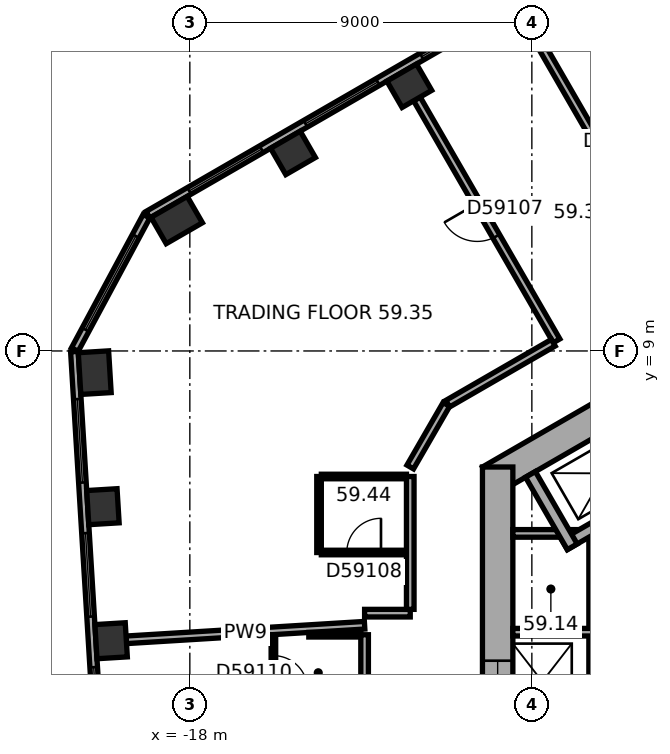
"""IFC4 building model, lengths in metres.
Left out: names, types, materials, properties, quantities, classifications, styles, units other than length and angle.
Written with IfcOpenShell. Run it as: python <this file> out.ifc"""

import sys

from ifc_helpers import new_model, si_unit, direction, frame, frame_2d, origin, origin_2d, place, context, subcontext, project, spatial, rectangle, extrude, element, fill, save


model = new_model("IFC4")
c1 = context("Model", 3, precision=1e-05, world=origin(), true_north=direction((0.0, 1.0)))
c2 = subcontext(c1, "Body", "Model", "MODEL_VIEW")
j1 = project(units=[si_unit("LENGTHUNIT", "METRE"), si_unit("PLANEANGLEUNIT", "RADIAN")], contexts=[c1])
p1 = place(None, origin())
s1 = spatial("IfcSite", under=j1, at=p1, CompositionType="ELEMENT")
p2 = place(p1, origin())
s2 = spatial("IfcBuilding", under=s1, at=p2, CompositionType="ELEMENT")
p3 = place(p2, frame((0.0, 0.0, 240.2)))
s3 = spatial("IfcBuildingStorey", under=s2, at=p3, CompositionType="ELEMENT", Elevation=240.2)
for number, where, z_axis, x_axis in (
    (1, (-12.225, 15.978, 0.0), (0.0, 0.0, 1.0), (-0.866, -0.5, 0.0)),
    (2, (-15.285, 14.211, 0.0), (0.0, 0.0, 1.0), (-0.866, -0.5, 0.0)),
):
    element("IfcColumn", number, at=place(p3, frame(where, z_axis=z_axis, x_axis=x_axis)), inside=s3, PredefinedType="COLUMN", context=c2, shape_type="SweptSolid", body=[
        extrude(rectangle(XDim=0.9, YDim=0.8, at=origin_2d()), origin(), (0.0, 0.0, 1.0), 3.7),
    ])
for number, where, z_axis, x_axis in (
    (3, (-18.345, 12.445, 0.0), (0.0, 0.0, 1.0), (-0.866, -0.5, 0.0)),
    (4, (-20.503, 8.429, 0.0), (0.0, 0.0, 1.0), (0.061, -0.998, 0.0)),
):
    element("IfcColumn", number, at=place(p3, frame(where, z_axis=z_axis, x_axis=x_axis)), inside=s3, PredefinedType="COLUMN", context=c2, shape_type="SweptSolid", body=[
        extrude(rectangle(XDim=1.1, YDim=0.8, at=origin_2d()), origin(), (0.0, 0.0, 1.0), 3.7),
    ])
for number, where, z_axis, x_axis in (
    (5, (-20.287, 4.902, 0.0), (0.0, 0.0, 1.0), (0.061, -0.998, 0.0)),
    (6, (-20.071, 1.375, 0.0), (0.0, 0.0, 1.0), (0.061, -0.998, 0.0)),
):
    element("IfcColumn", number, at=place(p3, frame(where, z_axis=z_axis, x_axis=x_axis)), inside=s3, PredefinedType="COLUMN", context=c2, shape_type="SweptSolid", body=[
        extrude(rectangle(XDim=0.9, YDim=0.8, at=origin_2d()), origin(), (0.0, 0.0, 1.0), 3.7),
    ])
p4 = place(p3, frame((0.2, 11.547, 0.0), z_axis=(0.0, 0.0, 1.0), x_axis=(-0.866023897231, -0.500002609418, 0.0)))
e7 = element("IfcWall", 7, at=p4, inside=s3, PredefinedType="SHEAR", context=c2, shape_type="SweptSolid", body=[
    extrude(rectangle(XDim=11.894, YDim=0.8, at=frame_2d((5.947, 0.0))), origin(), (0.0, 0.0, 1.0), 3.7),
])
p5 = place(p4, frame((6.147, 0.0, 0.0)))
e8 = element("IfcOpeningElement", 8, at=p5, cuts=e7, PredefinedType="OPENING", context=c2, shape_type="SweptSolid", body=[
    extrude(rectangle(XDim=1.5, YDim=2.1, at=frame_2d((0.75, 1.05))), frame((0.0, 0.41, 0.0), z_axis=(0.0, -1.0, 0.0), x_axis=(1.0, 0.0, 0.0)), (0.0, 0.0, 1.0), 0.82),
])
p6 = place(p4, frame((2.997, 0.0, 0.0)))
e9 = element("IfcOpeningElement", 9, at=p6, cuts=e7, PredefinedType="OPENING", context=c2, shape_type="SweptSolid", body=[
    extrude(rectangle(XDim=0.9, YDim=2.1, at=frame_2d((0.45, 1.05))), frame((0.0, 0.41, 0.0), z_axis=(0.0, -1.0, 0.0), x_axis=(1.0, 0.0, 0.0)), (0.0, 0.0, 1.0), 0.82),
])
p7 = place(p3, frame((-9.9, 5.947, 0.0), z_axis=(0.0, 0.0, 1.0), x_axis=(0.0, -1.0, 0.0)))
e10 = element("IfcWall", 10, at=p7, inside=s3, PredefinedType="SHEAR", context=c2, shape_type="SweptSolid", body=[
    extrude(rectangle(XDim=11.894, YDim=0.8, at=frame_2d((5.947, 0.0))), origin(), (0.0, 0.0, 1.0), 3.7),
])
p8 = place(p7, frame((5.097, 0.0, 0.0)))
e11 = element("IfcOpeningElement", 11, at=p8, cuts=e10, PredefinedType="OPENING", context=c2, shape_type="SweptSolid", body=[
    extrude(rectangle(XDim=1.1, YDim=2.1, at=frame_2d((0.55, 1.05))), frame((0.0, 0.41, 0.0), z_axis=(0.0, -1.0, 0.0), x_axis=(1.0, 0.0, 0.0)), (0.0, 0.0, 1.0), 0.82),
])
p9 = place(p7, frame((7.697, 0.0, 0.0)))
e12 = element("IfcOpeningElement", 12, at=p9, cuts=e10, PredefinedType="OPENING", context=c2, shape_type="SweptSolid", body=[
    extrude(rectangle(XDim=1.1, YDim=2.1, at=frame_2d((0.55, 1.05))), frame((0.0, 0.41, 0.0), z_axis=(0.0, -1.0, 0.0), x_axis=(1.0, 0.0, 0.0)), (0.0, 0.0, 1.0), 0.82),
])
p10 = place(p3, frame((-2.786, 22.005, 0.0), z_axis=(0.0, 0.0, 1.0), x_axis=(-0.866026555358, -0.49999800541, 0.0)))
e13 = element("IfcWall", 13, at=p10, inside=s3, PredefinedType="STANDARD", context=c2, shape_type="SweptSolid", body=[
    extrude(rectangle(XDim=18.841, YDim=0.2, at=frame_2d((9.421, 0.0))), origin(), (0.0, 0.0, 1.0), 3.7),
])
p11 = place(p10, frame((1.254, 0.0, 0.9)))
e14 = element("IfcOpeningElement", 14, at=p11, cuts=e13, PredefinedType="OPENING", context=c2, shape_type="SweptSolid", body=[
    extrude(rectangle(XDim=2.2, YDim=2.0, at=frame_2d((1.1, 1.0))), frame((0.0, 0.11, 0.0), z_axis=(0.0, -1.0, 0.0), x_axis=(1.0, 0.0, 0.0)), (0.0, 0.0, 1.0), 0.22),
])
p12 = place(p10, frame((4.788, 0.0, 0.9)))
e15 = element("IfcOpeningElement", 15, at=p12, cuts=e13, PredefinedType="OPENING", context=c2, shape_type="SweptSolid", body=[
    extrude(rectangle(XDim=2.2, YDim=2.0, at=frame_2d((1.1, 1.0))), frame((0.0, 0.11, 0.0), z_axis=(0.0, -1.0, 0.0), x_axis=(1.0, 0.0, 0.0)), (0.0, 0.0, 1.0), 0.22),
])
p13 = place(p10, frame((8.321, 0.0, 0.9)))
e16 = element("IfcOpeningElement", 16, at=p13, cuts=e13, PredefinedType="OPENING", context=c2, shape_type="SweptSolid", body=[
    extrude(rectangle(XDim=2.2, YDim=2.0, at=frame_2d((1.1, 1.0))), frame((0.0, 0.11, 0.0), z_axis=(0.0, -1.0, 0.0), x_axis=(1.0, 0.0, 0.0)), (0.0, 0.0, 1.0), 0.22),
])
p14 = place(p10, frame((11.855, 0.0, 0.9)))
e17 = element("IfcOpeningElement", 17, at=p14, cuts=e13, PredefinedType="OPENING", context=c2, shape_type="SweptSolid", body=[
    extrude(rectangle(XDim=2.2, YDim=2.0, at=frame_2d((1.1, 1.0))), frame((0.0, 0.11, 0.0), z_axis=(0.0, -1.0, 0.0), x_axis=(1.0, 0.0, 0.0)), (0.0, 0.0, 1.0), 0.22),
])
p15 = place(p10, frame((15.389, 0.0, 0.9)))
e18 = element("IfcOpeningElement", 18, at=p15, cuts=e13, PredefinedType="OPENING", context=c2, shape_type="SweptSolid", body=[
    extrude(rectangle(XDim=2.2, YDim=2.0, at=frame_2d((1.1, 1.0))), frame((0.0, 0.11, 0.0), z_axis=(0.0, -1.0, 0.0), x_axis=(1.0, 0.0, 0.0)), (0.0, 0.0, 1.0), 0.22),
])
p16 = place(p3, frame((-19.141, 12.545, 0.0), z_axis=(0.0, 0.0, 1.0), x_axis=(-0.473306370921, -0.880897882416, 0.0)))
e19 = element("IfcWall", 19, at=p16, inside=s3, PredefinedType="STANDARD", context=c2, shape_type="SweptSolid", body=[
    extrude(rectangle(XDim=3.983, YDim=0.2, at=frame_2d((1.991, 0.0))), origin(), (0.0, 0.0, 1.0), 3.7),
])
p17 = place(p16, frame((0.591, 0.0, 0.9)))
e20 = element("IfcOpeningElement", 20, at=p17, cuts=e19, PredefinedType="OPENING", context=c2, shape_type="SweptSolid", body=[
    extrude(rectangle(XDim=2.8, YDim=2.0, at=frame_2d((1.4, 1.0))), frame((0.0, 0.11, 0.0), z_axis=(0.0, -1.0, 0.0), x_axis=(1.0, 0.0, 0.0)), (0.0, 0.0, 1.0), 0.22),
])
p18 = place(p3, frame((-21.038, 8.984, 0.0), z_axis=(0.0, 0.0, 1.0), x_axis=(0.061043935634, -0.998135079998, 0.0)))
e21 = element("IfcWall", 21, at=p18, inside=s3, PredefinedType="STANDARD", context=c2, shape_type="SweptSolid", body=[
    extrude(rectangle(XDim=18.841, YDim=0.2, at=frame_2d((9.421, 0.0))), origin(), (0.0, 0.0, 1.0), 3.7),
])
p19 = place(p18, frame((1.253, 0.0, 0.9)))
e22 = element("IfcOpeningElement", 22, at=p19, cuts=e21, PredefinedType="OPENING", context=c2, shape_type="SweptSolid", body=[
    extrude(rectangle(XDim=2.2, YDim=2.0, at=frame_2d((1.1, 1.0))), frame((0.0, 0.11, 0.0), z_axis=(0.0, -1.0, 0.0), x_axis=(1.0, 0.0, 0.0)), (0.0, 0.0, 1.0), 0.22),
])
p20 = place(p18, frame((4.786, 0.0, 0.9)))
e23 = element("IfcOpeningElement", 23, at=p20, cuts=e21, PredefinedType="OPENING", context=c2, shape_type="SweptSolid", body=[
    extrude(rectangle(XDim=2.2, YDim=2.0, at=frame_2d((1.1, 1.0))), frame((0.0, 0.11, 0.0), z_axis=(0.0, -1.0, 0.0), x_axis=(1.0, 0.0, 0.0)), (0.0, 0.0, 1.0), 0.22),
])
p21 = place(p18, frame((8.32, 0.0, 0.9)))
e24 = element("IfcOpeningElement", 24, at=p21, cuts=e21, PredefinedType="OPENING", context=c2, shape_type="SweptSolid", body=[
    extrude(rectangle(XDim=2.2, YDim=2.0, at=frame_2d((1.1, 1.0))), frame((0.0, 0.11, 0.0), z_axis=(0.0, -1.0, 0.0), x_axis=(1.0, 0.0, 0.0)), (0.0, 0.0, 1.0), 0.22),
])
p22 = place(p18, frame((11.854, 0.0, 0.9)))
e25 = element("IfcOpeningElement", 25, at=p22, cuts=e21, PredefinedType="OPENING", context=c2, shape_type="SweptSolid", body=[
    extrude(rectangle(XDim=2.2, YDim=2.0, at=frame_2d((1.1, 1.0))), frame((0.0, 0.11, 0.0), z_axis=(0.0, -1.0, 0.0), x_axis=(1.0, 0.0, 0.0)), (0.0, 0.0, 1.0), 0.22),
])
p23 = place(p18, frame((15.387, 0.0, 0.9)))
e26 = element("IfcOpeningElement", 26, at=p23, cuts=e21, PredefinedType="OPENING", context=c2, shape_type="SweptSolid", body=[
    extrude(rectangle(XDim=2.2, YDim=2.0, at=frame_2d((1.1, 1.0))), frame((0.0, 0.11, 0.0), z_axis=(0.0, -1.0, 0.0), x_axis=(1.0, 0.0, 0.0)), (0.0, 0.0, 1.0), 0.22),
])
p24 = place(p3, frame((-7.4, 4.3, 0.0), z_axis=(0.0, 0.0, 1.0), x_axis=(0.0, -1.0, 0.0)))
e27 = element("IfcWall", 27, at=p24, inside=s3, PredefinedType="PARTITIONING", context=c2, shape_type="SweptSolid", body=[
    extrude(rectangle(XDim=8.0, YDim=0.2, at=frame_2d((4.0, 0.0))), origin(), (0.0, 0.0, 1.0), 3.42),
])
for number, where, z_axis, x_axis in (
    (28, (-7.3, 4.2, 0.0), (0.0, 0.0, 1.0), (-1.0, 0.0, 0.0)),
    (29, (-7.3, 1.6, 0.0), (0.0, 0.0, 1.0), (-1.0, 0.0, 0.0)),
):
    element("IfcWall", number, at=place(p3, frame(where, z_axis=z_axis, x_axis=x_axis)), inside=s3, PredefinedType="PARTITIONING", context=c2, shape_type="SweptSolid", body=[
        extrude(rectangle(XDim=2.2, YDim=0.2, at=frame_2d((1.1, 0.0))), origin(), (0.0, 0.0, 1.0), 3.42),
    ])
p25 = place(p3, frame((-5.24, 5.577, 0.0), z_axis=(0.0, 0.0, 1.0), x_axis=(-0.866014461049, -0.500018952895, 0.0)))
e30 = element("IfcWall", 30, at=p25, inside=s3, PredefinedType="SHEAR", context=c2, shape_type="SweptSolid", body=[
    extrude(rectangle(XDim=3.35, YDim=0.3, at=frame_2d((1.675, 0.0))), origin(), (0.0, 0.0, 1.0), 3.42),
])
p26 = place(p3, frame((-7.937, 3.847, 0.0), z_axis=(0.0, 0.0, 1.0), x_axis=(-0.50002983664, 0.866008176907, 0.0)))
e31 = element("IfcWall", 31, at=p26, inside=s3, PredefinedType="SHEAR", context=c2, shape_type="SweptSolid", body=[
    extrude(rectangle(XDim=2.2, YDim=0.3, at=frame_2d((1.1, 0.0))), origin(), (0.0, 0.0, 1.0), 3.42),
])
p27 = place(p3, frame((-19.672, 1.4, 0.0), z_axis=(0.0, 0.0, 1.0), x_axis=(0.99813499784, 0.061045278997, 0.0)))
e32 = element("IfcWall", 32, at=p27, inside=s3, PredefinedType="PARTITIONING", context=c2, shape_type="SweptSolid", body=[
    extrude(rectangle(XDim=6.283, YDim=0.2, at=frame_2d((3.142, 0.0))), origin(), (0.0, 0.0, 1.0), 2.87),
])
p28 = place(p3, frame((-15.801, -0.467, 0.0), z_axis=(0.0, 0.0, 1.0), x_axis=(0.0, 1.0, 0.0)))
e33 = element("IfcWall", 33, at=p28, inside=s3, PredefinedType="PARTITIONING", context=c2, shape_type="SweptSolid", body=[
    extrude(rectangle(XDim=2.0, YDim=0.12, at=frame_2d((1.0, 0.0))), origin(), (0.0, 0.0, 1.0), 3.42),
])
p29 = place(p28, frame((0.55, 0.0, 0.0)))
e34 = element("IfcOpeningElement", 34, at=p29, cuts=e33, PredefinedType="OPENING", context=c2, shape_type="SweptSolid", body=[
    extrude(rectangle(XDim=0.9, YDim=2.1, at=frame_2d((0.45, 1.05))), frame((0.0, 0.07, 0.0), z_axis=(0.0, -1.0, 0.0), x_axis=(1.0, 0.0, 0.0)), (0.0, 0.0, 1.0), 0.14),
])
p30 = place(p3, frame((-14.869, 1.533, 0.0), z_axis=(0.0, 0.0, 1.0), x_axis=(1.0, 0.0, 0.0)))
e35 = element("IfcWall", 35, at=p30, inside=s3, PredefinedType="PARTITIONING", context=c2, shape_type="SweptSolid", body=[
    extrude(rectangle(XDim=1.368, YDim=0.12, at=frame_2d((0.684, 0.0))), origin(), (0.0, 0.0, 1.0), 3.42),
])
p31 = place(p3, frame((-14.6, 3.697, 0.0), z_axis=(0.0, 0.0, 1.0), x_axis=(0.0, 1.0, 0.0)))
e36 = element("IfcWall", 36, at=p31, inside=s3, PredefinedType="PARTITIONING", context=c2, shape_type="SweptSolid", body=[
    extrude(rectangle(XDim=2.0, YDim=0.12, at=frame_2d((1.0, 0.0))), origin(), (0.0, 0.0, 1.0), 3.42),
])
p32 = place(p3, frame((-14.54, 5.697, 0.0), z_axis=(0.0, 0.0, 1.0), x_axis=(1.0, 0.0, 0.0)))
e37 = element("IfcWall", 37, at=p32, inside=s3, PredefinedType="PARTITIONING", context=c2, shape_type="SweptSolid", body=[
    extrude(rectangle(XDim=2.24, YDim=0.12, at=frame_2d((1.12, 0.0))), origin(), (0.0, 0.0, 1.0), 3.42),
])
p33 = place(p3, frame((-13.401, 1.533, 0.0), z_axis=(0.0, 0.0, 1.0), x_axis=(0.0, -1.0, 0.0)))
e38 = element("IfcWall", 38, at=p33, inside=s3, PredefinedType="PARTITIONING", context=c2, shape_type="SweptSolid", body=[
    extrude(rectangle(XDim=2.0, YDim=0.2, at=frame_2d((1.0, 0.0))), origin(), (0.0, 0.0, 1.0), 3.42),
])
p34 = place(p3, frame((-12.3, 3.697, 0.0), z_axis=(0.0, 0.0, 1.0), x_axis=(-1.0, 0.0, 0.0)))
e39 = element("IfcWall", 39, at=p34, inside=s3, PredefinedType="PARTITIONING", context=c2, shape_type="SweptSolid", body=[
    extrude(rectangle(XDim=2.24, YDim=0.12, at=frame_2d((1.12, 0.0))), origin(), (0.0, 0.0, 1.0), 3.42),
])
p35 = place(p34, frame((0.67, 0.0, 0.0)))
e40 = element("IfcOpeningElement", 40, at=p35, cuts=e39, PredefinedType="OPENING", context=c2, shape_type="SweptSolid", body=[
    extrude(rectangle(XDim=0.9, YDim=2.1, at=frame_2d((0.45, 1.05))), frame((0.0, 0.07, 0.0), z_axis=(0.0, -1.0, 0.0), x_axis=(1.0, 0.0, 0.0)), (0.0, 0.0, 1.0), 0.14),
])
p36 = place(p3, frame((-12.2, 2.101, 0.0), z_axis=(0.0, 0.0, 1.0), x_axis=(-1.0, 0.0, 0.0)))
e41 = element("IfcWall", 41, at=p36, inside=s3, PredefinedType="PARTITIONING", context=c2, shape_type="SweptSolid", body=[
    extrude(rectangle(XDim=1.201, YDim=0.2, at=frame_2d((0.601, 0.0))), origin(), (0.0, 0.0, 1.0), 3.42),
])
p37 = place(p3, frame((-12.2, 5.697, 0.0), z_axis=(0.0, 0.0, 1.0), x_axis=(0.0, -1.0, 0.0)))
e42 = element("IfcWall", 42, at=p37, inside=s3, PredefinedType="PARTITIONING", context=c2, shape_type="SweptSolid", body=[
    extrude(rectangle(XDim=3.496, YDim=0.2, at=frame_2d((1.748, 0.0))), origin(), (0.0, 0.0, 1.0), 3.42),
])
p38 = place(p3, frame((-12.025, 15.632, 0.0), z_axis=(0.0, 0.0, 1.0), x_axis=(0.499983153418, -0.866035129944, 0.0)))
e43 = element("IfcWall", 43, at=p38, inside=s3, PredefinedType="PARTITIONING", context=c2, shape_type="SweptSolid", body=[
    extrude(rectangle(XDim=7.35, YDim=0.2, at=frame_2d((3.675, 0.0))), origin(), (0.0, 0.0, 1.0), 3.42),
])
p39 = place(p38, frame((3.175, 0.0, 0.0)))
e44 = element("IfcOpeningElement", 44, at=p39, cuts=e43, PredefinedType="OPENING", context=c2, shape_type="SweptSolid", body=[
    extrude(rectangle(XDim=1.0, YDim=2.1, at=frame_2d((0.5, 1.05))), frame((0.0, 0.11, 0.0), z_axis=(0.0, -1.0, 0.0), x_axis=(1.0, 0.0, 0.0)), (0.0, 0.0, 1.0), 0.22),
])
p40 = place(p3, frame((-11.25, 7.592, 0.0), z_axis=(0.0, 0.0, 1.0), x_axis=(-0.500022797313, -0.86601224135, 0.0)))
e45 = element("IfcWall", 45, at=p40, inside=s3, PredefinedType="PARTITIONING", context=c2, shape_type="SweptSolid", body=[
    extrude(rectangle(XDim=1.9, YDim=0.2, at=frame_2d((0.95, 0.0))), origin(), (0.0, 0.0, 1.0), 3.42),
])
p41 = place(p3, frame((-8.965, 17.399, 0.0), z_axis=(0.0, 0.0, 1.0), x_axis=(0.499993683172, -0.866029050776, 0.0)))
e46 = element("IfcWall", 46, at=p41, inside=s3, PredefinedType="PARTITIONING", context=c2, shape_type="SweptSolid", body=[
    extrude(rectangle(XDim=7.35, YDim=0.2, at=frame_2d((3.675, 0.0))), origin(), (0.0, 0.0, 1.0), 2.87),
])
p42 = place(p41, frame((3.175, 0.0, 0.0)))
e47 = element("IfcOpeningElement", 47, at=p42, cuts=e46, PredefinedType="OPENING", context=c2, shape_type="SweptSolid", body=[
    extrude(rectangle(XDim=1.0, YDim=2.1, at=frame_2d((0.5, 1.05))), frame((0.0, 0.11, 0.0), z_axis=(0.0, -1.0, 0.0), x_axis=(1.0, 0.0, 0.0)), (0.0, 0.0, 1.0), 0.22),
])
p43 = place(p3, frame((-8.437, 9.217, 0.0), z_axis=(0.0, 0.0, 1.0), x_axis=(-0.866005660673, -0.500034194513, 0.0)))
e48 = element("IfcWall", 48, at=p43, inside=s3, PredefinedType="PARTITIONING", context=c2, shape_type="SweptSolid", body=[
    extrude(rectangle(XDim=3.209, YDim=0.2, at=frame_2d((1.604, 0.0))), origin(), (0.0, 0.0, 1.0), 3.42),
])
p44 = place(p13, origin())
e49 = element("IfcWindow", 49, at=p44, inside=s3, PartitioningType="SINGLE_PANEL", PredefinedType="WINDOW", context=c2, shape_type="SweptSolid", body=[
    extrude(rectangle(XDim=2.2, YDim=2.0, at=frame_2d((1.1, 1.0))), frame((0.0, 0.03, 0.0), z_axis=(0.0, -1.0, 0.0), x_axis=(1.0, 0.0, 0.0)), (0.0, 0.0, 1.0), 0.06),
])
fill(e16, e49)
p45 = place(p14, origin())
e50 = element("IfcWindow", 50, at=p45, inside=s3, PartitioningType="SINGLE_PANEL", PredefinedType="WINDOW", context=c2, shape_type="SweptSolid", body=[
    extrude(rectangle(XDim=2.2, YDim=2.0, at=frame_2d((1.1, 1.0))), frame((0.0, 0.03, 0.0), z_axis=(0.0, -1.0, 0.0), x_axis=(1.0, 0.0, 0.0)), (0.0, 0.0, 1.0), 0.06),
])
fill(e17, e50)
p46 = place(p15, origin())
e51 = element("IfcWindow", 51, at=p46, inside=s3, PartitioningType="SINGLE_PANEL", PredefinedType="WINDOW", context=c2, shape_type="SweptSolid", body=[
    extrude(rectangle(XDim=2.2, YDim=2.0, at=frame_2d((1.1, 1.0))), frame((0.0, 0.03, 0.0), z_axis=(0.0, -1.0, 0.0), x_axis=(1.0, 0.0, 0.0)), (0.0, 0.0, 1.0), 0.06),
])
fill(e18, e51)
p47 = place(p17, origin())
e52 = element("IfcWindow", 52, at=p47, inside=s3, PartitioningType="SINGLE_PANEL", PredefinedType="WINDOW", context=c2, shape_type="SweptSolid", body=[
    extrude(rectangle(XDim=2.8, YDim=2.0, at=frame_2d((1.4, 1.0))), frame((0.0, 0.03, 0.0), z_axis=(0.0, -1.0, 0.0), x_axis=(1.0, 0.0, 0.0)), (0.0, 0.0, 1.0), 0.06),
])
fill(e20, e52)
p48 = place(p19, origin())
e53 = element("IfcWindow", 53, at=p48, inside=s3, PartitioningType="SINGLE_PANEL", PredefinedType="WINDOW", context=c2, shape_type="SweptSolid", body=[
    extrude(rectangle(XDim=2.2, YDim=2.0, at=frame_2d((1.1, 1.0))), frame((0.0, 0.03, 0.0), z_axis=(0.0, -1.0, 0.0), x_axis=(1.0, 0.0, 0.0)), (0.0, 0.0, 1.0), 0.06),
])
fill(e22, e53)
p49 = place(p20, origin())
e54 = element("IfcWindow", 54, at=p49, inside=s3, PartitioningType="SINGLE_PANEL", PredefinedType="WINDOW", context=c2, shape_type="SweptSolid", body=[
    extrude(rectangle(XDim=2.2, YDim=2.0, at=frame_2d((1.1, 1.0))), frame((0.0, 0.03, 0.0), z_axis=(0.0, -1.0, 0.0), x_axis=(1.0, 0.0, 0.0)), (0.0, 0.0, 1.0), 0.06),
])
fill(e23, e54)
p50 = place(p21, origin())
e55 = element("IfcWindow", 55, at=p50, inside=s3, PartitioningType="SINGLE_PANEL", PredefinedType="WINDOW", context=c2, shape_type="SweptSolid", body=[
    extrude(rectangle(XDim=2.2, YDim=2.0, at=frame_2d((1.1, 1.0))), frame((0.0, 0.03, 0.0), z_axis=(0.0, -1.0, 0.0), x_axis=(1.0, 0.0, 0.0)), (0.0, 0.0, 1.0), 0.06),
])
fill(e24, e55)
p51 = place(p8, origin())
e56 = element("IfcDoor", 56, at=p51, inside=s3, OperationType="DOUBLE_DOOR_SLIDING", PredefinedType="DOOR", context=c2, shape_type="SweptSolid", body=[
    extrude(rectangle(XDim=1.1, YDim=2.1, at=frame_2d((0.55, 1.05))), frame((0.0, 0.025, 0.0), z_axis=(0.0, -1.0, 0.0), x_axis=(1.0, 0.0, 0.0)), (0.0, 0.0, 1.0), 0.05),
])
fill(e11, e56)
p52 = place(p39, origin())
e57 = element("IfcDoor", 57, at=p52, inside=s3, OperationType="SINGLE_SWING_LEFT", PredefinedType="DOOR", context=c2, shape_type="SweptSolid", body=[
    extrude(rectangle(XDim=1.0, YDim=2.1, at=frame_2d((0.5, 1.05))), frame((0.0, 0.025, 0.0), z_axis=(0.0, -1.0, 0.0), x_axis=(1.0, 0.0, 0.0)), (0.0, 0.0, 1.0), 0.05),
])
fill(e44, e57)
p53 = place(p35, origin())
e58 = element("IfcDoor", 58, at=p53, inside=s3, OperationType="SINGLE_SWING_LEFT", PredefinedType="DOOR", context=c2, shape_type="SweptSolid", body=[
    extrude(rectangle(XDim=0.9, YDim=2.1, at=frame_2d((0.45, 1.05))), frame((0.0, 0.025, 0.0), z_axis=(0.0, -1.0, 0.0), x_axis=(1.0, 0.0, 0.0)), (0.0, 0.0, 1.0), 0.05),
])
fill(e40, e58)
p54 = place(p29, origin())
e59 = element("IfcDoor", 59, at=p54, inside=s3, OperationType="SINGLE_SWING_LEFT", PredefinedType="DOOR", context=c2, shape_type="SweptSolid", body=[
    extrude(rectangle(XDim=0.9, YDim=2.1, at=frame_2d((0.45, 1.05))), frame((0.0, 0.025, 0.0), z_axis=(0.0, -1.0, 0.0), x_axis=(1.0, 0.0, 0.0)), (0.0, 0.0, 1.0), 0.05),
])
fill(e34, e59)
save(model, sys.argv[1])
